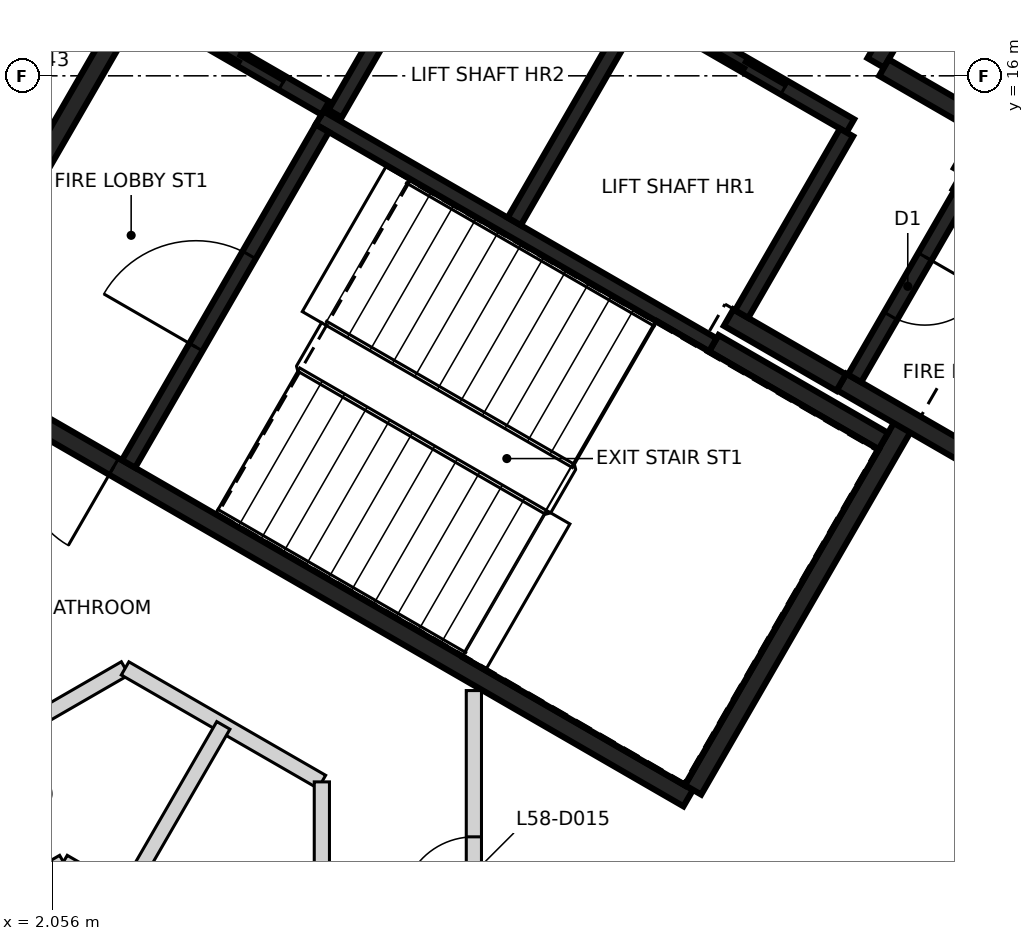
"""IFC4 building model, lengths in metres.
Left out: names, types, materials, properties, quantities, classifications, styles, units other than length and angle.
Written with IfcOpenShell. Run it as: python <this file> out.ifc"""

import sys

from ifc_helpers import new_model, si_unit, direction, frame, frame_2d, origin, place, context, subcontext, project, spatial, rectangle, extrude, element, fill, save


model = new_model("IFC4")
c1 = context("Model", 3, precision=1e-05, world=origin(), true_north=direction((0.0, 1.0)))
c2 = subcontext(c1, "Body", "Model", "MODEL_VIEW")
j1 = project(units=[si_unit("LENGTHUNIT", "METRE"), si_unit("PLANEANGLEUNIT", "RADIAN")], contexts=[c1])
p1 = place(None, origin())
s1 = spatial("IfcSite", under=j1, at=p1, CompositionType="ELEMENT")
p2 = place(p1, origin())
s2 = spatial("IfcBuilding", under=s1, at=p2, CompositionType="ELEMENT")
p3 = place(p2, frame((0.0, 0.0, 232.2)))
s3 = spatial("IfcBuildingStorey", under=s2, at=p3, CompositionType="ELEMENT", Elevation=232.2)
p4 = place(p3, frame((10.42, 6.498, 0.0), z_axis=(0.0, 0.0, 1.0), x_axis=(-0.866021906294, 0.500006057782, 0.0)))
e1 = element("IfcWall", 1, at=p4, inside=s3, PredefinedType="SHEAR", context=c2, shape_type="SweptSolid", body=[
    extrude(rectangle(XDim=11.55, YDim=0.25, at=frame_2d((5.775, 0.0))), origin(), (0.0, 0.0, 1.0), 3.25),
])
p5 = place(p4, frame((10.025, 0.0, 0.0)))
e2 = element("IfcOpeningElement", 2, at=p5, cuts=e1, PredefinedType="OPENING", context=c2, shape_type="SweptSolid", body=[
    extrude(rectangle(XDim=1.2, YDim=2.1, at=frame_2d((0.6, 1.05))), frame((0.0, 0.135, 0.0), z_axis=(0.0, -1.0, 0.0), x_axis=(1.0, 0.0, 0.0)), (0.0, 0.0, 1.0), 0.27),
])
p6 = place(p4, frame((8.725, 0.0, 0.0)))
e3 = element("IfcOpeningElement", 3, at=p6, cuts=e1, PredefinedType="OPENING", context=c2, shape_type="SweptSolid", body=[
    extrude(rectangle(XDim=1.2, YDim=2.1, at=frame_2d((0.6, 1.05))), frame((0.0, 0.135, 0.0), z_axis=(0.0, -1.0, 0.0), x_axis=(1.0, 0.0, 0.0)), (0.0, 0.0, 1.0), 0.27),
])
p7 = place(p3, frame((0.48, 12.381, 0.0), z_axis=(0.0, 0.0, 1.0), x_axis=(0.49999885962, 0.866026062182, 0.0)))
e4 = element("IfcWall", 4, at=p7, inside=s3, PredefinedType="SHEAR", context=c2, shape_type="SweptSolid", body=[
    extrude(rectangle(XDim=5.225, YDim=0.25, at=frame_2d((2.612, 0.0))), origin(), (0.0, 0.0, 1.0), 3.25),
])
p8 = place(p3, frame((13.238, 11.378, 0.0), z_axis=(0.0, 0.0, 1.0), x_axis=(-0.500008851346, -0.866020293397, 0.0)))
e5 = element("IfcWall", 5, at=p8, inside=s3, PredefinedType="SHEAR", context=c2, shape_type="SweptSolid", body=[
    extrude(rectangle(XDim=5.51, YDim=0.25, at=frame_2d((2.755, 0.0))), origin(), (0.0, 0.0, 1.0), 3.25),
])
p9 = place(p3, frame((14.918, 10.54, 0.0), z_axis=(0.0, 0.0, 1.0), x_axis=(-0.866063538972, 0.499933942099, 0.0)))
e6 = element("IfcWall", 6, at=p9, inside=s3, PredefinedType="SHEAR", context=c2, shape_type="SweptSolid", body=[
    extrude(rectangle(XDim=2.865, YDim=0.25, at=frame_2d((1.432, 0.0))), origin(), (0.0, 0.0, 1.0), 3.25),
])
p10 = place(p3, frame((13.963, 14.614, 0.0), z_axis=(0.0, 0.0, 1.0), x_axis=(0.866042235819, -0.499970844928, 0.0)))
e7 = element("IfcWall", 7, at=p10, inside=s3, PredefinedType="SHEAR", context=c2, shape_type="SweptSolid", body=[
    extrude(rectangle(XDim=2.865, YDim=0.25, at=frame_2d((1.432, 0.0))), origin(), (0.0, 0.0, 1.0), 3.25),
])
p11 = place(p3, frame((10.757, 12.481, 0.0), z_axis=(0.0, 0.0, 1.0), x_axis=(0.866022940537, -0.500004266446, 0.0)))
e8 = element("IfcWall", 8, at=p11, inside=s3, PredefinedType="SHEAR", context=c2, shape_type="SweptSolid", body=[
    extrude(rectangle(XDim=2.575, YDim=0.25, at=frame_2d((1.287, 0.0))), origin(), (0.0, 0.0, 1.0), 3.25),
])
p12 = place(p3, frame((13.819, 17.785, 0.0), z_axis=(0.0, 0.0, 1.0), x_axis=(-0.500039802285, -0.866002422705, 0.0)))
e9 = element("IfcWall", 9, at=p12, inside=s3, PredefinedType="SHEAR", context=c2, shape_type="SweptSolid", body=[
    extrude(rectangle(XDim=1.865, YDim=0.25, at=frame_2d((0.932, 0.0))), origin(), (0.0, 0.0, 1.0), 3.25),
])
p13 = place(p3, frame((12.433, 11.964, 0.0), z_axis=(0.0, 0.0, 1.0), x_axis=(-0.866038183914, 0.499977863513, 0.0)))
e10 = element("IfcWall", 10, at=p13, inside=s3, PredefinedType="SHEAR", context=c2, shape_type="SweptSolid", body=[
    extrude(rectangle(XDim=1.71, YDim=0.25, at=frame_2d((0.855, 0.0))), origin(), (0.0, 0.0, 1.0), 3.25),
])
p14 = place(p3, frame((12.995, 16.108, 0.0), z_axis=(0.0, 0.0, 1.0), x_axis=(0.866044474677, -0.49996696679, 0.0)))
e11 = element("IfcWall", 11, at=p14, inside=s3, PredefinedType="SHEAR", context=c2, shape_type="SweptSolid", body=[
    extrude(rectangle(XDim=1.584, YDim=0.25, at=frame_2d((0.792, 0.0))), origin(), (0.0, 0.0, 1.0), 3.25),
])
p15 = place(p3, frame((14.305, 15.207, 0.0), z_axis=(0.0, 0.0, 1.0), x_axis=(-0.499848422343, -0.866112899501, 0.0)))
e12 = element("IfcWall", 12, at=p15, inside=s3, PredefinedType="SHEAR", context=c2, shape_type="SweptSolid", body=[
    extrude(rectangle(XDim=0.559, YDim=0.25, at=frame_2d((0.28, 0.0))), origin(), (0.0, 0.0, 1.0), 3.25),
])
p16 = place(p3, frame((12.552, 15.342, 0.0), z_axis=(0.0, 0.0, 1.0), x_axis=(-0.866030299012, 0.499991521122, 0.0)))
e13 = element("IfcWall", 13, at=p16, inside=s3, PredefinedType="SHEAR", context=c2, shape_type="SweptSolid", body=[
    extrude(rectangle(XDim=6.1, YDim=0.2, at=frame_2d((3.05, 0.0))), origin(), (0.0, 0.0, 1.0), 3.25),
])
p17 = place(p16, frame((1.0, 0.0, 0.0)))
e14 = element("IfcOpeningElement", 14, at=p17, cuts=e13, PredefinedType="OPENING", context=c2, shape_type="SweptSolid", body=[
    extrude(rectangle(XDim=1.2, YDim=2.1, at=frame_2d((0.6, 1.05))), frame((0.0, 0.11, 0.0), z_axis=(0.0, -1.0, 0.0), x_axis=(1.0, 0.0, 0.0)), (0.0, 0.0, 1.0), 0.22),
])
p18 = place(p16, frame((3.982, 0.0, 0.0)))
e15 = element("IfcOpeningElement", 15, at=p18, cuts=e13, PredefinedType="OPENING", context=c2, shape_type="SweptSolid", body=[
    extrude(rectangle(XDim=1.2, YDim=2.1, at=frame_2d((0.6, 1.05))), frame((0.0, 0.11, 0.0), z_axis=(0.0, -1.0, 0.0), x_axis=(1.0, 0.0, 0.0)), (0.0, 0.0, 1.0), 0.22),
])
p19 = place(p3, frame((10.743, 12.46, 0.0), z_axis=(0.0, 0.0, 1.0), x_axis=(-0.866018848283, 0.500011354289, 0.0)))
e16 = element("IfcWall", 16, at=p19, inside=s3, PredefinedType="SHEAR", context=c2, shape_type="SweptSolid", body=[
    extrude(rectangle(XDim=5.974, YDim=0.2, at=frame_2d((2.987, 0.0))), origin(), (0.0, 0.0, 1.0), 3.25),
])
p20 = place(p3, frame((3.057, 10.895, 0.0), z_axis=(0.0, 0.0, 1.0), x_axis=(0.500027839223, 0.866009330205, 0.0)))
e17 = element("IfcWall", 17, at=p20, inside=s3, PredefinedType="SHEAR", context=c2, shape_type="SweptSolid", body=[
    extrude(rectangle(XDim=5.098, YDim=0.2, at=frame_2d((2.549, 0.0))), origin(), (0.0, 0.0, 1.0), 3.25),
])
p21 = place(p20, frame((1.774, 0.0, 0.0)))
e18 = element("IfcOpeningElement", 18, at=p21, cuts=e17, PredefinedType="OPENING", context=c2, shape_type="SweptSolid", body=[
    extrude(rectangle(XDim=1.4, YDim=2.1, at=frame_2d((0.7, 1.05))), frame((0.0, 0.11, 0.0), z_axis=(0.0, -1.0, 0.0), x_axis=(1.0, 0.0, 0.0)), (0.0, 0.0, 1.0), 0.22),
])
p22 = place(p3, frame((8.132, 14.084, 0.0), z_axis=(0.0, 0.0, 1.0), x_axis=(0.500030834389, 0.86600760081, 0.0)))
e19 = element("IfcWall", 19, at=p22, inside=s3, PredefinedType="SHEAR", context=c2, shape_type="SweptSolid", body=[
    extrude(rectangle(XDim=3.198, YDim=0.2, at=frame_2d((1.599, 0.0))), origin(), (0.0, 0.0, 1.0), 3.25),
])
p23 = place(p3, frame((14.008, 14.442, 0.0), z_axis=(0.0, 0.0, 1.0), x_axis=(-0.499986818241, -0.866033014143, 0.0)))
e20 = element("IfcWall", 20, at=p23, inside=s3, PredefinedType="SHEAR", context=c2, shape_type="SweptSolid", body=[
    extrude(rectangle(XDim=2.798, YDim=0.2, at=frame_2d((1.399, 0.0))), origin(), (0.0, 0.0, 1.0), 3.25),
])
p24 = place(p23, frame((0.949, 0.0, 0.0)))
e21 = element("IfcOpeningElement", 21, at=p24, cuts=e20, PredefinedType="OPENING", context=c2, shape_type="SweptSolid", body=[
    extrude(rectangle(XDim=0.9, YDim=2.1, at=frame_2d((0.45, 1.05))), frame((0.0, 0.11, 0.0), z_axis=(0.0, -1.0, 0.0), x_axis=(1.0, 0.0, 0.0)), (0.0, 0.0, 1.0), 0.22),
])
p25 = place(p3, frame((12.502, 15.255, 0.0), z_axis=(0.0, 0.0, 1.0), x_axis=(-0.499965018551, -0.866045599391, 0.0)))
e22 = element("IfcWall", 22, at=p25, inside=s3, PredefinedType="SHEAR", context=c2, shape_type="SweptSolid", body=[
    extrude(rectangle(XDim=2.759, YDim=0.2, at=frame_2d((1.379, 0.0))), origin(), (0.0, 0.0, 1.0), 3.25),
])
p26 = place(p3, frame((7.324, 18.187, 0.0), z_axis=(0.0, 0.0, 1.0), x_axis=(-0.499967891604, -0.866043940782, 0.0)))
e23 = element("IfcWall", 23, at=p26, inside=s3, PredefinedType="SHEAR", context=c2, shape_type="SweptSolid", body=[
    extrude(rectangle(XDim=3.1, YDim=0.2, at=frame_2d((1.55, 0.0))), origin(), (0.0, 0.0, 1.0), 3.25),
])
p27 = place(p3, frame((5.646, 15.576, 0.0), z_axis=(0.0, 0.0, 1.0), x_axis=(-0.866018407898, 0.500012117035, 0.0)))
e24 = element("IfcWall", 24, at=p27, inside=s3, PredefinedType="SHEAR", context=c2, shape_type="SweptSolid", body=[
    extrude(rectangle(XDim=2.651, YDim=0.2, at=frame_2d((1.325, 0.0))), origin(), (0.0, 0.0, 1.0), 3.25),
])
p28 = place(p27, frame((0.652, 0.0, 0.0)))
e25 = element("IfcOpeningElement", 25, at=p28, cuts=e24, PredefinedType="OPENING", context=c2, shape_type="SweptSolid", body=[
    extrude(rectangle(XDim=1.3, YDim=2.1, at=frame_2d((0.65, 1.05))), frame((0.0, 0.11, 0.0), z_axis=(0.0, -1.0, 0.0), x_axis=(1.0, 0.0, 0.0)), (0.0, 0.0, 1.0), 0.22),
])
p29 = place(p3, frame((-8.612, 1.494, 0.0), z_axis=(0.0, 0.0, 1.0), x_axis=(0.8660441356, 0.49996755414, 0.0)))
e26 = element("IfcWall", 26, at=p29, inside=s3, PredefinedType="PARTITIONING", context=c2, shape_type="SweptSolid", body=[
    extrude(rectangle(XDim=13.422, YDim=0.2, at=frame_2d((6.711, 0.0))), origin(), (0.0, 0.0, 1.0), 3.25),
])
p30 = place(p29, frame((9.611, 0.0, 0.0)))
e27 = element("IfcOpeningElement", 27, at=p30, cuts=e26, PredefinedType="OPENING", context=c2, shape_type="SweptSolid", body=[
    extrude(rectangle(XDim=0.9, YDim=2.1, at=frame_2d((0.45, 1.05))), frame((0.0, 0.11, 0.0), z_axis=(0.0, -1.0, 0.0), x_axis=(1.0, 0.0, 0.0)), (0.0, 0.0, 1.0), 0.22),
])
p31 = place(p29, frame((2.911, 0.0, 0.0)))
e28 = element("IfcOpeningElement", 28, at=p31, cuts=e26, PredefinedType="OPENING", context=c2, shape_type="SweptSolid", body=[
    extrude(rectangle(XDim=0.9, YDim=2.1, at=frame_2d((0.45, 1.05))), frame((0.0, 0.11, 0.0), z_axis=(0.0, -1.0, 0.0), x_axis=(1.0, 0.0, 0.0)), (0.0, 0.0, 1.0), 0.22),
])
p32 = place(p3, frame((-1.084, 12.65, 0.0), z_axis=(0.0, 0.0, 1.0), x_axis=(0.492373019537, 0.87038428848, 0.0)))
e29 = element("IfcWall", 29, at=p32, inside=s3, PredefinedType="PARTITIONING", context=c2, shape_type="SweptSolid", body=[
    extrude(rectangle(XDim=8.738, YDim=0.2, at=frame_2d((4.369, 0.0))), origin(), (0.0, 0.0, 1.0), 3.25),
])
p33 = place(p32, frame((5.23, 0.0, 0.0)))
e30 = element("IfcOpeningElement", 30, at=p33, cuts=e29, PredefinedType="OPENING", context=c2, shape_type="SweptSolid", body=[
    extrude(rectangle(XDim=1.0, YDim=2.1, at=frame_2d((0.5, 1.05))), frame((0.0, 0.11, 0.0), z_axis=(0.0, -1.0, 0.0), x_axis=(1.0, 0.0, 0.0)), (0.0, 0.0, 1.0), 0.22),
])
p34 = place(p3, frame((3.011, 8.204, 0.0), z_axis=(0.0, 0.0, 1.0), x_axis=(0.86628077395, -0.499557424812, 0.0)))
e31 = element("IfcWall", 31, at=p34, inside=s3, PredefinedType="PARTITIONING", context=c2, shape_type="SweptSolid", body=[
    extrude(rectangle(XDim=2.989, YDim=0.2, at=frame_2d((1.494, 0.0))), origin(), (0.0, 0.0, 1.0), 3.25),
])
p35 = place(p3, frame((5.6, -6.711, 0.0), z_axis=(0.0, 0.0, 1.0), x_axis=(0.0, 1.0, 0.0)))
e32 = element("IfcWall", 32, at=p35, inside=s3, PredefinedType="PARTITIONING", context=c2, shape_type="SweptSolid", body=[
    extrude(rectangle(XDim=13.422, YDim=0.2, at=frame_2d((6.711, 0.0))), origin(), (0.0, 0.0, 1.0), 3.25),
])
p36 = place(p35, frame((2.912, 0.0, 0.0)))
e33 = element("IfcOpeningElement", 33, at=p36, cuts=e32, PredefinedType="OPENING", context=c2, shape_type="SweptSolid", body=[
    extrude(rectangle(XDim=0.9, YDim=2.1, at=frame_2d((0.45, 1.05))), frame((0.0, 0.11, 0.0), z_axis=(0.0, -1.0, 0.0), x_axis=(1.0, 0.0, 0.0)), (0.0, 0.0, 1.0), 0.22),
])
p37 = place(p35, frame((9.611, 0.0, 0.0)))
e34 = element("IfcOpeningElement", 34, at=p37, cuts=e32, PredefinedType="OPENING", context=c2, shape_type="SweptSolid", body=[
    extrude(rectangle(XDim=0.9, YDim=2.1, at=frame_2d((0.45, 1.05))), frame((0.0, 0.11, 0.0), z_axis=(0.0, -1.0, 0.0), x_axis=(1.0, 0.0, 0.0)), (0.0, 0.0, 1.0), 0.22),
])
p38 = place(p3, frame((7.6, -4.966, 0.0), z_axis=(0.0, 0.0, 1.0), x_axis=(0.0, 1.0, 0.0)))
e35 = element("IfcWall", 35, at=p38, inside=s3, PredefinedType="PARTITIONING", context=c2, shape_type="SweptSolid", body=[
    extrude(rectangle(XDim=12.878, YDim=0.2, at=frame_2d((6.439, 0.0))), origin(), (0.0, 0.0, 1.0), 3.25),
])
p39 = place(p38, frame((10.004, 0.0, 0.0)))
e36 = element("IfcOpeningElement", 36, at=p39, cuts=e35, PredefinedType="OPENING", context=c2, shape_type="SweptSolid", body=[
    extrude(rectangle(XDim=0.95, YDim=2.1, at=frame_2d((0.475, 1.05))), frame((0.0, 0.11, 0.0), z_axis=(0.0, -1.0, 0.0), x_axis=(1.0, 0.0, 0.0)), (0.0, 0.0, 1.0), 0.22),
])
p40 = place(p3, frame((-6.0, 0.924, 0.0), z_axis=(0.0, 0.0, 1.0), x_axis=(0.866012967051, 0.500021540435, 0.0)))
e37 = element("IfcWall", 37, at=p40, inside=s3, PredefinedType="PARTITIONING", context=c2, shape_type="SweptSolid", body=[
    extrude(rectangle(XDim=9.468, YDim=0.2, at=frame_2d((4.734, 0.0))), origin(), (0.0, 0.0, 1.0), 3.25),
])
p41 = place(p3, frame((2.2, 5.658, 0.0), z_axis=(0.0, 0.0, 1.0), x_axis=(0.865818011038, -0.500359042851, 0.0)))
e38 = element("IfcWall", 38, at=p41, inside=s3, PredefinedType="PARTITIONING", context=c2, shape_type="SweptSolid", body=[
    extrude(rectangle(XDim=1.848, YDim=0.2, at=frame_2d((0.924, 0.0))), origin(), (0.0, 0.0, 1.0), 3.25),
])
p42 = place(p3, frame((3.0, 5.196, 0.0), z_axis=(0.0, 0.0, 1.0), x_axis=(0.500076354988, 0.865981315724, 0.0)))
e39 = element("IfcWall", 39, at=p42, inside=s3, PredefinedType="PARTITIONING", context=c2, shape_type="SweptSolid", body=[
    extrude(rectangle(XDim=2.607, YDim=0.2, at=frame_2d((1.304, 0.0))), origin(), (0.0, 0.0, 1.0), 3.25),
])
p43 = place(p28, origin())
e40 = element("IfcDoor", 40, at=p43, inside=s3, OperationType="SLIDING_TO_RIGHT", PredefinedType="DOOR", context=c2, shape_type="SweptSolid", body=[
    extrude(rectangle(XDim=1.3, YDim=2.1, at=frame_2d((0.65, 1.05))), frame((0.0, 0.025, 0.0), z_axis=(0.0, -1.0, 0.0), x_axis=(1.0, 0.0, 0.0)), (0.0, 0.0, 1.0), 0.05),
])
fill(e25, e40)
p44 = place(p17, origin())
e41 = element("IfcDoor", 41, at=p44, inside=s3, OperationType="DOUBLE_DOOR_SLIDING", PredefinedType="DOOR", context=c2, shape_type="SweptSolid", body=[
    extrude(rectangle(XDim=1.2, YDim=2.1, at=frame_2d((0.6, 1.05))), frame((0.0, 0.025, 0.0), z_axis=(0.0, -1.0, 0.0), x_axis=(1.0, 0.0, 0.0)), (0.0, 0.0, 1.0), 0.05),
])
fill(e14, e41)
p45 = place(p6, origin())
e42 = element("IfcDoor", 42, at=p45, inside=s3, OperationType="SINGLE_SWING_RIGHT", PredefinedType="DOOR", context=c2, shape_type="SweptSolid", body=[
    extrude(rectangle(XDim=1.2, YDim=2.1, at=frame_2d((0.6, 1.05))), frame((0.0, 0.025, 0.0), z_axis=(0.0, -1.0, 0.0), x_axis=(1.0, 0.0, 0.0)), (0.0, 0.0, 1.0), 0.05),
])
fill(e3, e42)
p46 = place(p21, origin())
e43 = element("IfcDoor", 43, at=p46, inside=s3, OperationType="SINGLE_SWING_RIGHT", PredefinedType="DOOR", context=c2, shape_type="SweptSolid", body=[
    extrude(rectangle(XDim=1.4, YDim=2.1, at=frame_2d((0.7, 1.05))), frame((0.0, 0.025, 0.0), z_axis=(0.0, -1.0, 0.0), x_axis=(1.0, 0.0, 0.0)), (0.0, 0.0, 1.0), 0.05),
])
fill(e18, e43)
p47 = place(p24, origin())
e44 = element("IfcDoor", 44, at=p47, inside=s3, OperationType="SINGLE_SWING_LEFT", PredefinedType="DOOR", context=c2, shape_type="SweptSolid", body=[
    extrude(rectangle(XDim=0.9, YDim=2.1, at=frame_2d((0.45, 1.05))), frame((0.0, 0.025, 0.0), z_axis=(0.0, -1.0, 0.0), x_axis=(1.0, 0.0, 0.0)), (0.0, 0.0, 1.0), 0.05),
])
fill(e21, e44)
p48 = place(p39, frame((0.95, 0.0, 0.0), z_axis=(0.0, 0.0, 1.0), x_axis=(-1.0, 0.0, 0.0)))
e45 = element("IfcDoor", 45, at=p48, inside=s3, OperationType="SINGLE_SWING_LEFT", PredefinedType="DOOR", context=c2, shape_type="SweptSolid", body=[
    extrude(rectangle(XDim=0.95, YDim=2.1, at=frame_2d((0.475, 1.05))), frame((0.0, 0.025, 0.0), z_axis=(0.0, -1.0, 0.0), x_axis=(1.0, 0.0, 0.0)), (0.0, 0.0, 1.0), 0.05),
])
fill(e36, e45)
save(model, sys.argv[1])
